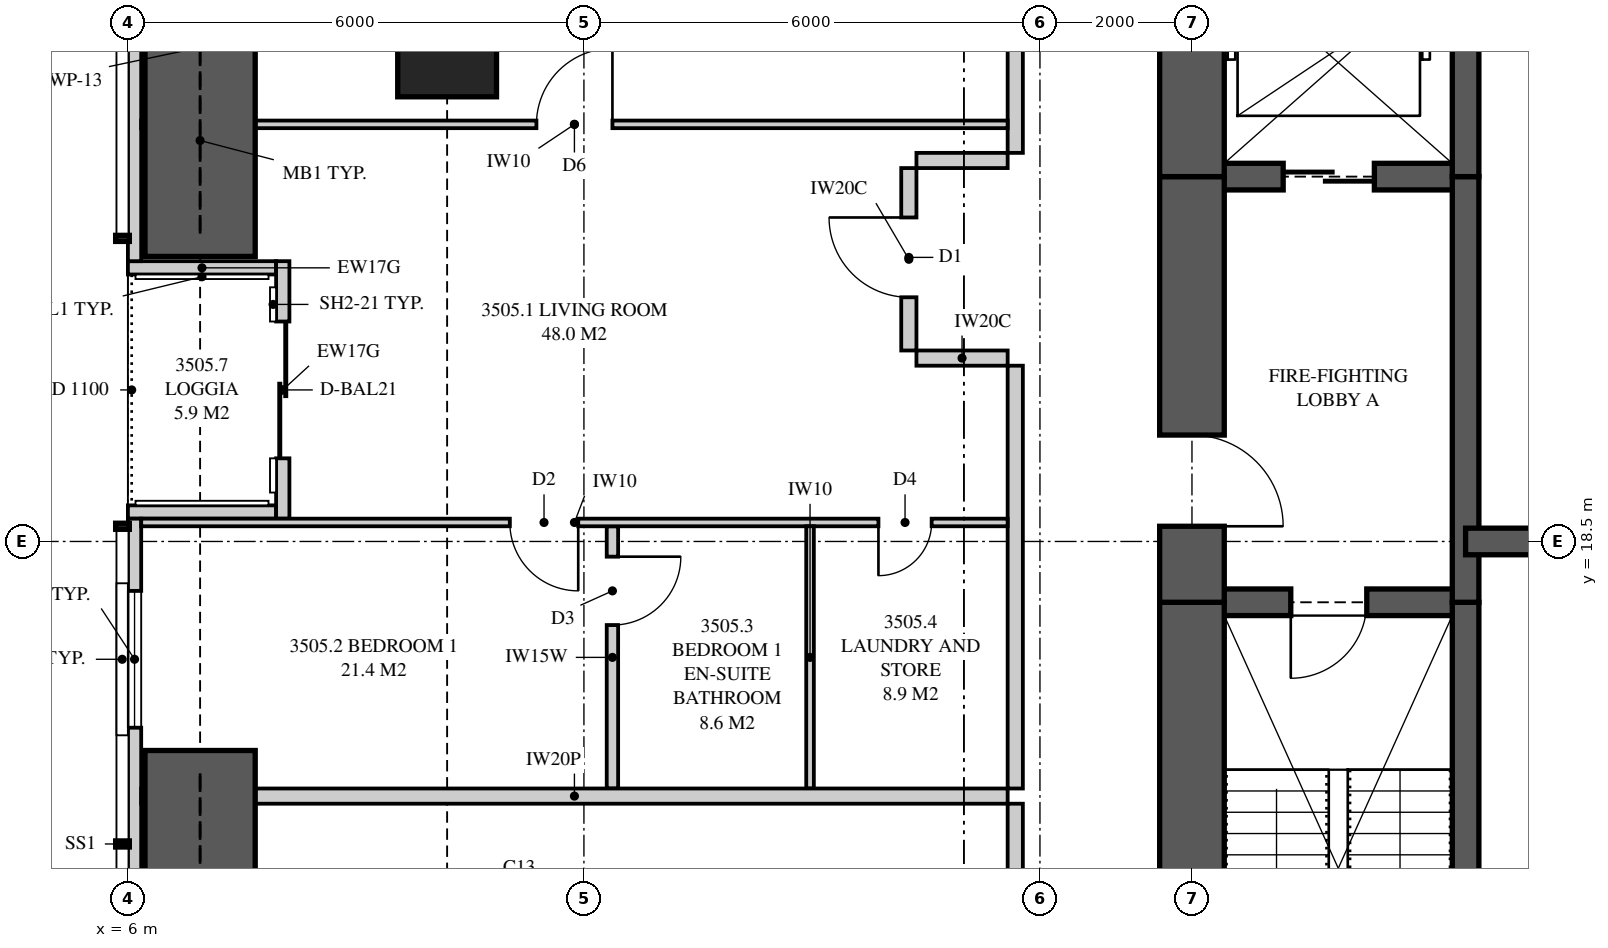
"""IFC4 building model, lengths in metres.
Left out: names, types, materials, properties, quantities, classifications, styles, units other than length and angle.
Written with IfcOpenShell. Run it as: python <this file> out.ifc"""

import sys

from ifc_helpers import new_model, si_unit, direction, frame, frame_2d, origin, origin_2d, place, context, subcontext, project, spatial, polyline, rectangle, outline, extrude, element, fill, save


model = new_model("IFC4")
c1 = context("Model", 3, precision=1e-05, world=origin(), true_north=direction((0.0, 1.0)))
c2 = subcontext(c1, "Body", "Model", "MODEL_VIEW")
j1 = project(units=[si_unit("LENGTHUNIT", "METRE"), si_unit("PLANEANGLEUNIT", "RADIAN")], contexts=[c1])
p1 = place(None, origin())
s1 = spatial("IfcSite", under=j1, at=p1, CompositionType="ELEMENT")
p2 = place(p1, origin())
s2 = spatial("IfcBuilding", under=s1, at=p2, CompositionType="ELEMENT")
p3 = place(p2, frame((0.0, 0.0, 128.3)))
s3 = spatial("IfcBuildingStorey", under=s2, at=p3, CompositionType="ELEMENT", Elevation=128.3)
p4 = place(p3, frame((10.2, 25.0, 0.0), z_axis=(0.0, 0.0, 1.0), x_axis=(1.0, 0.0, 0.0)))
e1 = element("IfcColumn", 1, at=p4, inside=s3, PredefinedType="COLUMN", context=c2, shape_type="SweptSolid", body=[
    extrude(rectangle(XDim=1.3, YDim=1.3, at=origin_2d()), origin(), (0.0, 0.0, 1.0), 3.35),
])
p5 = place(p3, frame((20.0, 26.125, 0.0), z_axis=(0.0, 0.0, 1.0), x_axis=(0.0, -1.0, 0.0)))
e2 = element("IfcWall", 2, at=p5, inside=s3, PredefinedType="SHEAR", context=c2, shape_type="SweptSolid", body=[
    extrude(rectangle(XDim=2.825, YDim=0.85, at=frame_2d((1.413, 0.0))), origin(), (0.0, 0.0, 1.0), 3.35),
])
p6 = place(p3, frame((20.0, 23.3, 0.0), z_axis=(0.0, 0.0, 1.0), x_axis=(0.0, -1.0, 0.0)))
e3 = element("IfcWall", 3, at=p6, inside=s3, PredefinedType="SHEAR", context=c2, shape_type="SweptSolid", body=[
    extrude(rectangle(XDim=5.6, YDim=0.85, at=frame_2d((2.8, 0.0))), origin(), (0.0, 0.0, 1.0), 3.35),
])
p7 = place(p6, frame((3.4, 0.0, 0.0)))
e4 = element("IfcOpeningElement", 4, at=p7, cuts=e3, PredefinedType="OPENING", context=c2, shape_type="SweptSolid", body=[
    extrude(rectangle(XDim=1.2, YDim=2.2, at=frame_2d((0.6, 1.1))), frame((0.0, 0.435, 0.0), z_axis=(0.0, -1.0, 0.0), x_axis=(1.0, 0.0, 0.0)), (0.0, 0.0, 1.0), 0.87),
])
p8 = place(p3, frame((20.0, 17.7, 0.0), z_axis=(0.0, 0.0, 1.0), x_axis=(0.0, -1.0, 0.0)))
e5 = element("IfcWall", 5, at=p8, inside=s3, PredefinedType="SHEAR", context=c2, shape_type="SweptSolid", body=[
    extrude(rectangle(XDim=4.7, YDim=0.85, at=frame_2d((2.35, 0.0))), origin(), (0.0, 0.0, 1.0), 3.35),
])
p9 = place(p3, frame((23.6, 10.875, 0.0), z_axis=(0.0, 0.0, 1.0), x_axis=(0.0, 1.0, 0.0)))
e6 = element("IfcWall", 6, at=p9, inside=s3, PredefinedType="SHEAR", context=c2, shape_type="SweptSolid", body=[
    extrude(rectangle(XDim=6.825, YDim=0.35, at=frame_2d((3.413, 0.0))), origin(), (0.0, 0.0, 1.0), 3.35),
])
p10 = place(p3, frame((23.6, 17.7, 0.0), z_axis=(0.0, 0.0, 1.0), x_axis=(0.0, 1.0, 0.0)))
e7 = element("IfcWall", 7, at=p10, inside=s3, PredefinedType="SHEAR", context=c2, shape_type="SweptSolid", body=[
    extrude(rectangle(XDim=5.6, YDim=0.35, at=frame_2d((2.8, 0.0))), origin(), (0.0, 0.0, 1.0), 3.35),
])
p11 = place(p3, frame((23.6, 23.3, 0.0), z_axis=(0.0, 0.0, 1.0), x_axis=(0.0, 1.0, 0.0)))
e8 = element("IfcWall", 8, at=p11, inside=s3, PredefinedType="SHEAR", context=c2, shape_type="SweptSolid", body=[
    extrude(rectangle(XDim=2.825, YDim=0.35, at=frame_2d((1.413, 0.0))), origin(), (0.0, 0.0, 1.0), 3.35),
])
p12 = place(p3, frame((20.0, 17.7, 0.0), z_axis=(0.0, 0.0, 1.0), x_axis=(1.0, 0.0, 0.0)))
e9 = element("IfcWall", 9, at=p12, inside=s3, PredefinedType="SHEAR", context=c2, shape_type="SweptSolid", body=[
    extrude(rectangle(XDim=3.6, YDim=0.35, at=frame_2d((1.8, 0.0))), origin(), (0.0, 0.0, 1.0), 3.35),
])
p13 = place(p12, frame((1.3, 0.0, 0.0)))
e10 = element("IfcOpeningElement", 10, at=p13, cuts=e9, PredefinedType="OPENING", context=c2, shape_type="SweptSolid", body=[
    extrude(rectangle(XDim=1.0, YDim=2.1, at=frame_2d((0.5, 1.05))), frame((0.0, 0.185, 0.0), z_axis=(0.0, -1.0, 0.0), x_axis=(1.0, 0.0, 0.0)), (0.0, 0.0, 1.0), 0.37),
])
p14 = place(p3, frame((20.0, 23.3, 0.0), z_axis=(0.0, 0.0, 1.0), x_axis=(1.0, 0.0, 0.0)))
e11 = element("IfcWall", 11, at=p14, inside=s3, PredefinedType="SHEAR", context=c2, shape_type="SweptSolid", body=[
    extrude(rectangle(XDim=3.6, YDim=0.35, at=frame_2d((1.8, 0.0))), origin(), (0.0, 0.0, 1.0), 3.35),
])
p15 = place(p14, frame((1.2, 0.0, 0.0)))
e12 = element("IfcOpeningElement", 12, at=p15, cuts=e11, PredefinedType="OPENING", context=c2, shape_type="SweptSolid", body=[
    extrude(rectangle(XDim=1.2, YDim=2.1, at=frame_2d((0.6, 1.05))), frame((0.0, 0.185, 0.0), z_axis=(0.0, -1.0, 0.0), x_axis=(1.0, 0.0, 0.0)), (0.0, 0.0, 1.0), 0.37),
])
p16 = place(p3, frame((23.6, 18.5, 0.0), z_axis=(0.0, 0.0, 1.0), x_axis=(1.0, 0.0, 0.0)))
e13 = element("IfcWall", 13, at=p16, inside=s3, PredefinedType="SHEAR", context=c2, shape_type="SweptSolid", body=[
    extrude(rectangle(XDim=2.4, YDim=0.35, at=frame_2d((1.2, 0.0))), origin(), (0.0, 0.0, 1.0), 3.35),
])
p17 = place(p3, frame((6.087, 34.949, 0.0), z_axis=(0.0, 0.0, 1.0), x_axis=(0.0, -1.0, 0.0)))
e14 = element("IfcWall", 14, at=p17, inside=s3, PredefinedType="SOLIDWALL", context=c2, shape_type="SweptSolid", body=[
    extrude(outline(polyline([(0.0, 0.0), (12.761, 0.0), (12.761, 2.15), (9.949, 2.15), (9.949, 3.11), (9.823, 3.11), (9.823, 2.15), (9.73, 2.15), (9.73, 3.11), (0.0, 3.11), (0.0, 0.0)])), frame((0.0, 0.087, 0.0), z_axis=(0.0, -1.0, 0.0), x_axis=(1.0, 0.0, 0.0)), (0.0, 0.0, 1.0), 0.175),
])
p18 = place(p17, frame((2.618, 0.0, 0.4)))
e15 = element("IfcOpeningElement", 15, at=p18, cuts=e14, PredefinedType="OPENING", context=c2, shape_type="SweptSolid", body=[
    extrude(rectangle(XDim=1.8, YDim=1.7, at=frame_2d((0.9, 0.85))), frame((0.0, 0.097, 0.0), z_axis=(0.0, -1.0, 0.0), x_axis=(1.0, 0.0, 0.0)), (0.0, 0.0, 1.0), 0.195),
])
p19 = place(p17, frame((5.874, 0.0, 0.4)))
e16 = element("IfcOpeningElement", 16, at=p19, cuts=e14, PredefinedType="OPENING", context=c2, shape_type="SweptSolid", body=[
    extrude(rectangle(XDim=1.2, YDim=1.7, at=frame_2d((0.6, 0.85))), frame((0.0, 0.097, 0.0), z_axis=(0.0, -1.0, 0.0), x_axis=(1.0, 0.0, 0.0)), (0.0, 0.0, 1.0), 0.195),
])
p20 = place(p3, frame((6.087, 18.8, 0.0), z_axis=(0.0, 0.0, 1.0), x_axis=(0.0, -1.0, 0.0)))
e17 = element("IfcWall", 17, at=p20, inside=s3, PredefinedType="SOLIDWALL", context=c2, shape_type="SweptSolid", body=[
    extrude(outline(polyline([(0.0, 0.0), (15.749, 0.0), (15.749, 3.11), (6.019, 3.11), (6.019, 2.15), (5.926, 2.15), (5.926, 3.11), (5.8, 3.11), (5.8, 2.15), (0.0, 2.15), (0.0, 0.0)])), frame((0.0, 0.087, 0.0), z_axis=(0.0, -1.0, 0.0), x_axis=(1.0, 0.0, 0.0)), (0.0, 0.0, 1.0), 0.175),
])
p21 = place(p20, frame((0.95, 0.0, 0.4)))
e18 = element("IfcOpeningElement", 18, at=p21, cuts=e17, PredefinedType="OPENING", context=c2, shape_type="SweptSolid", body=[
    extrude(rectangle(XDim=1.8, YDim=1.7, at=frame_2d((0.9, 0.85))), frame((0.0, 0.097, 0.0), z_axis=(0.0, -1.0, 0.0), x_axis=(1.0, 0.0, 0.0)), (0.0, 0.0, 1.0), 0.195),
])
p22 = place(p20, frame((8.76, 0.0, 0.4)))
e19 = element("IfcOpeningElement", 19, at=p22, cuts=e17, PredefinedType="OPENING", context=c2, shape_type="SweptSolid", body=[
    extrude(rectangle(XDim=1.2, YDim=1.7, at=frame_2d((0.6, 0.85))), frame((0.0, 0.097, 0.0), z_axis=(0.0, -1.0, 0.0), x_axis=(1.0, 0.0, 0.0)), (0.0, 0.0, 1.0), 0.195),
])
p23 = place(p20, frame((11.831, 0.0, 0.4)))
e20 = element("IfcOpeningElement", 20, at=p23, cuts=e17, PredefinedType="OPENING", context=c2, shape_type="SweptSolid", body=[
    extrude(rectangle(XDim=1.8, YDim=1.7, at=frame_2d((0.9, 0.85))), frame((0.0, 0.097, 0.0), z_axis=(0.0, -1.0, 0.0), x_axis=(1.0, 0.0, 0.0)), (0.0, 0.0, 1.0), 0.195),
])
p24 = place(p3, frame((8.038, 22.188, 0.0), z_axis=(0.0, 0.0, 1.0), x_axis=(0.0, -1.0, 0.0)))
e21 = element("IfcWall", 21, at=p24, inside=s3, PredefinedType="SOLIDWALL", context=c2, shape_type="SweptSolid", body=[
    extrude(rectangle(XDim=3.387, YDim=0.175, at=frame_2d((1.694, 0.0))), origin(), (0.0, 0.0, 1.0), 3.11),
])
p25 = place(p24, frame((0.794, 0.0, 0.0)))
e22 = element("IfcOpeningElement", 22, at=p25, cuts=e21, PredefinedType="OPENING", context=c2, shape_type="SweptSolid", body=[
    extrude(rectangle(XDim=1.8, YDim=2.1, at=frame_2d((0.9, 1.05))), frame((0.0, 0.097, 0.0), z_axis=(0.0, -1.0, 0.0), x_axis=(1.0, 0.0, 0.0)), (0.0, 0.0, 1.0), 0.195),
])
for number, where, z_axis, x_axis in (
    (23, (6.0, 22.1, 0.0), (0.0, 0.0, 1.0), (1.0, 0.0, 0.0)),
    (24, (6.0, 18.887, 0.0), (0.0, 0.0, 1.0), (1.0, 0.0, 0.0)),
):
    element("IfcWall", number, at=place(p3, frame(where, z_axis=z_axis, x_axis=x_axis)), inside=s3, PredefinedType="SOLIDWALL", context=c2, shape_type="SweptSolid", body=[
        extrude(outline(polyline([(0.0, 0.0), (1.95, 0.0), (1.95, 3.11), (1.75, 3.11), (1.75, 2.15), (0.15, 2.15), (0.15, 3.11), (0.0, 3.11), (0.0, 0.0)])), frame((0.0, 0.087, 0.0), z_axis=(0.0, -1.0, 0.0), x_axis=(1.0, 0.0, 0.0)), (0.0, 0.0, 1.0), 0.175),
    ])
p26 = place(p3, frame((6.175, 15.15, 0.0), z_axis=(0.0, 0.0, 1.0), x_axis=(1.0, 0.0, 0.0)))
e25 = element("IfcWall", 25, at=p26, inside=s3, PredefinedType="PARTITIONING", context=c2, shape_type="SweptSolid", body=[
    extrude(outline(polyline([(0.529, 2.15), (0.0, 2.15), (0.0, 0.0), (0.529, 0.0), (0.529, 0.034), (1.021, 0.034), (1.021, 0.0), (11.4, 0.0), (11.4, 3.11), (5.335, 3.11), (5.335, 2.51), (2.715, 2.51), (2.715, 3.11), (1.685, 3.11), (1.685, 2.15), (1.021, 2.15), (1.021, 2.116), (0.529, 2.116), (0.529, 2.15)])), frame((0.0, 0.1, 0.0), z_axis=(0.0, -1.0, 0.0), x_axis=(1.0, 0.0, 0.0)), (0.0, 0.0, 1.0), 0.2),
])
p27 = place(p3, frame((17.675, 15.25, 0.0), z_axis=(0.0, 0.0, 1.0), x_axis=(0.0, 1.0, 0.0)))
e26 = element("IfcWall", 26, at=p27, inside=s3, PredefinedType="PARTITIONING", context=c2, shape_type="SweptSolid", body=[
    extrude(rectangle(XDim=5.562, YDim=0.2, at=frame_2d((2.781, 0.0))), origin(), (0.0, 0.0, 1.0), 3.11),
])
p28 = place(p3, frame((6.175, 18.75, 0.0), z_axis=(0.0, 0.0, 1.0), x_axis=(1.0, 0.0, 0.0)))
e27 = element("IfcWall", 27, at=p28, inside=s3, PredefinedType="PARTITIONING", context=c2, shape_type="SweptSolid", body=[
    extrude(outline(polyline([(0.0, 0.0), (11.4, 0.0), (11.4, 3.11), (5.285, 3.11), (5.285, 2.51), (2.765, 2.51), (2.765, 3.11), (1.635, 3.11), (1.635, 2.15), (0.0, 2.15), (0.0, 3.11), (0.0, 0.0)])), frame((0.0, 0.05, 0.0), z_axis=(0.0, -1.0, 0.0), x_axis=(1.0, 0.0, 0.0)), (0.0, 0.0, 1.0), 0.1),
])
p29 = place(p28, frame((4.85, 0.0, 0.0)))
e28 = element("IfcOpeningElement", 28, at=p29, cuts=e27, PredefinedType="OPENING", context=c2, shape_type="SweptSolid", body=[
    extrude(rectangle(XDim=0.9, YDim=2.1, at=frame_2d((0.45, 1.05))), frame((0.0, 0.06, 0.0), z_axis=(0.0, -1.0, 0.0), x_axis=(1.0, 0.0, 0.0)), (0.0, 0.0, 1.0), 0.12),
])
p30 = place(p28, frame((9.7, 0.0, 0.0)))
e29 = element("IfcOpeningElement", 29, at=p30, cuts=e27, PredefinedType="OPENING", context=c2, shape_type="SweptSolid", body=[
    extrude(rectangle(XDim=0.7, YDim=2.1, at=frame_2d((0.35, 1.05))), frame((0.0, 0.06, 0.0), z_axis=(0.0, -1.0, 0.0), x_axis=(1.0, 0.0, 0.0)), (0.0, 0.0, 1.0), 0.12),
])
p31 = place(p3, frame((12.375, 15.25, 0.0), z_axis=(0.0, 0.0, 1.0), x_axis=(0.0, 1.0, 0.0)))
e30 = element("IfcWall", 30, at=p31, inside=s3, PredefinedType="PLUMBINGWALL", context=c2, shape_type="SweptSolid", body=[
    extrude(rectangle(XDim=3.45, YDim=0.15, at=frame_2d((1.725, 0.0))), origin(), (0.0, 0.0, 1.0), 3.11),
])
p32 = place(p31, frame((2.15, 0.0, 0.0)))
e31 = element("IfcOpeningElement", 31, at=p32, cuts=e30, PredefinedType="OPENING", context=c2, shape_type="SweptSolid", body=[
    extrude(rectangle(XDim=0.9, YDim=2.1, at=frame_2d((0.45, 1.05))), frame((0.0, 0.085, 0.0), z_axis=(0.0, -1.0, 0.0), x_axis=(1.0, 0.0, 0.0)), (0.0, 0.0, 1.0), 0.17),
])
p33 = place(p3, frame((14.975, 15.25, 0.0), z_axis=(0.0, 0.0, 1.0), x_axis=(0.0, 1.0, 0.0)))
e32 = element("IfcWall", 32, at=p33, inside=s3, PredefinedType="PARTITIONING", context=c2, shape_type="SweptSolid", body=[
    extrude(rectangle(XDim=3.45, YDim=0.1, at=frame_2d((1.725, 0.0))), origin(), (0.0, 0.0, 1.0), 3.11),
])
p34 = place(p3, frame((6.175, 23.988, 0.0), z_axis=(0.0, 0.0, 1.0), x_axis=(1.0, 0.0, 0.0)))
e33 = element("IfcWall", 33, at=p34, inside=s3, PredefinedType="PARTITIONING", context=c2, shape_type="SweptSolid", body=[
    extrude(outline(polyline([(0.529, 2.15), (0.0, 2.15), (0.0, 0.0), (0.529, 0.0), (0.529, 0.778), (1.021, 0.778), (1.021, 0.0), (11.4, 0.0), (11.4, 3.11), (5.285, 3.11), (5.285, 2.51), (2.765, 2.51), (2.765, 3.11), (1.635, 3.11), (1.635, 2.15), (1.021, 2.15), (1.021, 1.372), (0.529, 1.372), (0.529, 2.15)])), frame((0.0, 0.05, 0.0), z_axis=(0.0, -1.0, 0.0), x_axis=(1.0, 0.0, 0.0)), (0.0, 0.0, 1.0), 0.1),
])
p35 = place(p34, frame((5.2, 0.0, 0.0)))
e34 = element("IfcOpeningElement", 34, at=p35, cuts=e33, PredefinedType="OPENING", context=c2, shape_type="SweptSolid", body=[
    extrude(rectangle(XDim=1.0, YDim=2.1, at=frame_2d((0.5, 1.05))), frame((0.0, 0.06, 0.0), z_axis=(0.0, -1.0, 0.0), x_axis=(1.0, 0.0, 0.0)), (0.0, 0.0, 1.0), 0.12),
])
p36 = place(p3, frame((17.675, 23.613, 0.0), z_axis=(0.0, 0.0, 1.0), x_axis=(0.0, 1.0, 0.0)))
e35 = element("IfcWall", 35, at=p36, inside=s3, PredefinedType="PARTITIONING", context=c2, shape_type="SweptSolid", body=[
    extrude(outline(polyline([(0.0, 0.0), (5.562, 0.0), (5.562, 3.11), (3.15, 3.11), (3.15, 2.541), (2.475, 2.541), (2.475, 3.11), (0.0, 3.11), (0.0, 0.0)])), frame((0.0, 0.1, 0.0), z_axis=(0.0, -1.0, 0.0), x_axis=(1.0, 0.0, 0.0)), (0.0, 0.0, 1.0), 0.2),
])
p37 = place(p3, frame((16.275, 21.012, 0.0), z_axis=(0.0, 0.0, 1.0), x_axis=(0.0, 1.0, 0.0)))
e36 = element("IfcWall", 36, at=p37, inside=s3, PredefinedType="PARTITIONING", context=c2, shape_type="SweptSolid", body=[
    extrude(rectangle(XDim=2.4, YDim=0.2, at=frame_2d((1.2, 0.0))), origin(), (0.0, 0.0, 1.0), 3.11),
])
p38 = place(p37, frame((0.7, 0.0, 0.0)))
e37 = element("IfcOpeningElement", 37, at=p38, cuts=e36, PredefinedType="OPENING", context=c2, shape_type="SweptSolid", body=[
    extrude(rectangle(XDim=1.05, YDim=2.2, at=frame_2d((0.525, 1.1))), frame((0.0, 0.11, 0.0), z_axis=(0.0, -1.0, 0.0), x_axis=(1.0, 0.0, 0.0)), (0.0, 0.0, 1.0), 0.22),
])
for number, where, z_axis, x_axis in (
    (38, (17.575, 20.913, 0.0), (0.0, 0.0, 1.0), (-1.0, 0.0, 0.0)),
    (39, (17.575, 23.512, 0.0), (0.0, 0.0, 1.0), (-1.0, 0.0, 0.0)),
):
    element("IfcWall", number, at=place(p3, frame(where, z_axis=z_axis, x_axis=x_axis)), inside=s3, PredefinedType="PARTITIONING", context=c2, shape_type="SweptSolid", body=[
        extrude(rectangle(XDim=1.2, YDim=0.2, at=frame_2d((0.6, 0.0))), origin(), (0.0, 0.0, 1.0), 3.11),
    ])
p39 = place(p3, frame((17.675, 13.637, 0.0), z_axis=(0.0, 0.0, 1.0), x_axis=(0.0, 1.0, 0.0)))
e40 = element("IfcWall", 40, at=p39, inside=s3, PredefinedType="PARTITIONING", context=c2, shape_type="SweptSolid", body=[
    extrude(rectangle(XDim=1.413, YDim=0.2, at=frame_2d((0.706, 0.0))), origin(), (0.0, 0.0, 1.0), 3.11),
])
for number, where, z_axis, x_axis in (
    (41, (6.95, 22.25, 0.0), (0.0, 0.0, 1.0), (0.0, 1.0, 0.0)),
    (42, (6.95, 10.25, 0.0), (0.0, 0.0, 1.0), (0.0, 1.0, 0.0)),
):
    element("IfcWall", number, at=place(p3, frame(where, z_axis=z_axis, x_axis=x_axis)), inside=s3, PredefinedType="SHEAR", context=c2, shape_type="SweptSolid", body=[
        extrude(rectangle(XDim=5.5, YDim=1.45, at=frame_2d((2.75, 0.0))), origin(), (0.0, 0.0, 1.0), 3.35),
    ])
p40 = place(p25, origin())
e43 = element("IfcDoor", 43, at=p40, inside=s3, OperationType="SLIDING_TO_LEFT", PredefinedType="DOOR", context=c2, shape_type="SweptSolid", body=[
    extrude(rectangle(XDim=1.8, YDim=2.1, at=frame_2d((0.9, 1.05))), frame((0.0, 0.025, 0.0), z_axis=(0.0, -1.0, 0.0), x_axis=(1.0, 0.0, 0.0)), (0.0, 0.0, 1.0), 0.05),
])
fill(e22, e43)
p41 = place(p21, origin())
e44 = element("IfcWindow", 44, at=p41, inside=s3, PartitioningType="SINGLE_PANEL", PredefinedType="WINDOW", context=c2, shape_type="SweptSolid", body=[
    extrude(rectangle(XDim=1.8, YDim=1.7, at=frame_2d((0.9, 0.85))), frame((0.0, 0.03, 0.0), z_axis=(0.0, -1.0, 0.0), x_axis=(1.0, 0.0, 0.0)), (0.0, 0.0, 1.0), 0.06),
])
fill(e18, e44)
p42 = place(p38, origin())
e45 = element("IfcDoor", 45, at=p42, inside=s3, OperationType="SINGLE_SWING_RIGHT", PredefinedType="DOOR", context=c2, shape_type="SweptSolid", body=[
    extrude(rectangle(XDim=1.05, YDim=2.2, at=frame_2d((0.525, 1.1))), frame((0.0, 0.025, 0.0), z_axis=(0.0, -1.0, 0.0), x_axis=(1.0, 0.0, 0.0)), (0.0, 0.0, 1.0), 0.05),
])
fill(e37, e45)
p43 = place(p29, frame((0.9, 0.0, 0.0), z_axis=(0.0, 0.0, 1.0), x_axis=(-1.0, 0.0, 0.0)))
e46 = element("IfcDoor", 46, at=p43, inside=s3, OperationType="SINGLE_SWING_LEFT", PredefinedType="DOOR", context=c2, shape_type="SweptSolid", body=[
    extrude(rectangle(XDim=0.9, YDim=2.1, at=frame_2d((0.45, 1.05))), frame((0.0, 0.025, 0.0), z_axis=(0.0, -1.0, 0.0), x_axis=(1.0, 0.0, 0.0)), (0.0, 0.0, 1.0), 0.05),
])
fill(e28, e46)
p44 = place(p32, frame((0.9, 0.0, 0.0), z_axis=(0.0, 0.0, 1.0), x_axis=(-1.0, 0.0, 0.0)))
e47 = element("IfcDoor", 47, at=p44, inside=s3, OperationType="SINGLE_SWING_LEFT", PredefinedType="DOOR", context=c2, shape_type="SweptSolid", body=[
    extrude(rectangle(XDim=0.9, YDim=2.1, at=frame_2d((0.45, 1.05))), frame((0.0, 0.025, 0.0), z_axis=(0.0, -1.0, 0.0), x_axis=(1.0, 0.0, 0.0)), (0.0, 0.0, 1.0), 0.05),
])
fill(e31, e47)
p45 = place(p30, frame((0.7, 0.0, 0.0), z_axis=(0.0, 0.0, 1.0), x_axis=(-1.0, 0.0, 0.0)))
e48 = element("IfcDoor", 48, at=p45, inside=s3, OperationType="SINGLE_SWING_RIGHT", PredefinedType="DOOR", context=c2, shape_type="SweptSolid", body=[
    extrude(rectangle(XDim=0.7, YDim=2.1, at=frame_2d((0.35, 1.05))), frame((0.0, 0.025, 0.0), z_axis=(0.0, -1.0, 0.0), x_axis=(1.0, 0.0, 0.0)), (0.0, 0.0, 1.0), 0.05),
])
fill(e29, e48)
p46 = place(p35, origin())
e49 = element("IfcDoor", 49, at=p46, inside=s3, OperationType="SINGLE_SWING_RIGHT", PredefinedType="DOOR", context=c2, shape_type="SweptSolid", body=[
    extrude(rectangle(XDim=1.0, YDim=2.1, at=frame_2d((0.5, 1.05))), frame((0.0, 0.025, 0.0), z_axis=(0.0, -1.0, 0.0), x_axis=(1.0, 0.0, 0.0)), (0.0, 0.0, 1.0), 0.05),
])
fill(e34, e49)
p47 = place(p13, frame((1.0, 0.0, 0.0), z_axis=(0.0, 0.0, 1.0), x_axis=(-1.0, 0.0, 0.0)))
e50 = element("IfcDoor", 50, at=p47, inside=s3, OperationType="SINGLE_SWING_RIGHT", PredefinedType="DOOR", context=c2, shape_type="SweptSolid", body=[
    extrude(rectangle(XDim=1.0, YDim=2.1, at=frame_2d((0.5, 1.05))), frame((0.0, 0.025, 0.0), z_axis=(0.0, -1.0, 0.0), x_axis=(1.0, 0.0, 0.0)), (0.0, 0.0, 1.0), 0.05),
])
fill(e10, e50)
p48 = place(p7, origin())
e51 = element("IfcDoor", 51, at=p48, inside=s3, OperationType="SINGLE_SWING_RIGHT", PredefinedType="DOOR", context=c2, shape_type="SweptSolid", body=[
    extrude(rectangle(XDim=1.2, YDim=2.2, at=frame_2d((0.6, 1.1))), frame((0.0, 0.025, 0.0), z_axis=(0.0, -1.0, 0.0), x_axis=(1.0, 0.0, 0.0)), (0.0, 0.0, 1.0), 0.05),
])
fill(e4, e51)
p49 = place(p15, origin())
e52 = element("IfcDoor", 52, at=p49, inside=s3, OperationType="SLIDING_TO_LEFT", PredefinedType="DOOR", context=c2, shape_type="SweptSolid", body=[
    extrude(rectangle(XDim=1.2, YDim=2.1, at=frame_2d((0.6, 1.05))), frame((0.0, 0.025, 0.0), z_axis=(0.0, -1.0, 0.0), x_axis=(1.0, 0.0, 0.0)), (0.0, 0.0, 1.0), 0.05),
])
fill(e12, e52)
save(model, sys.argv[1])
